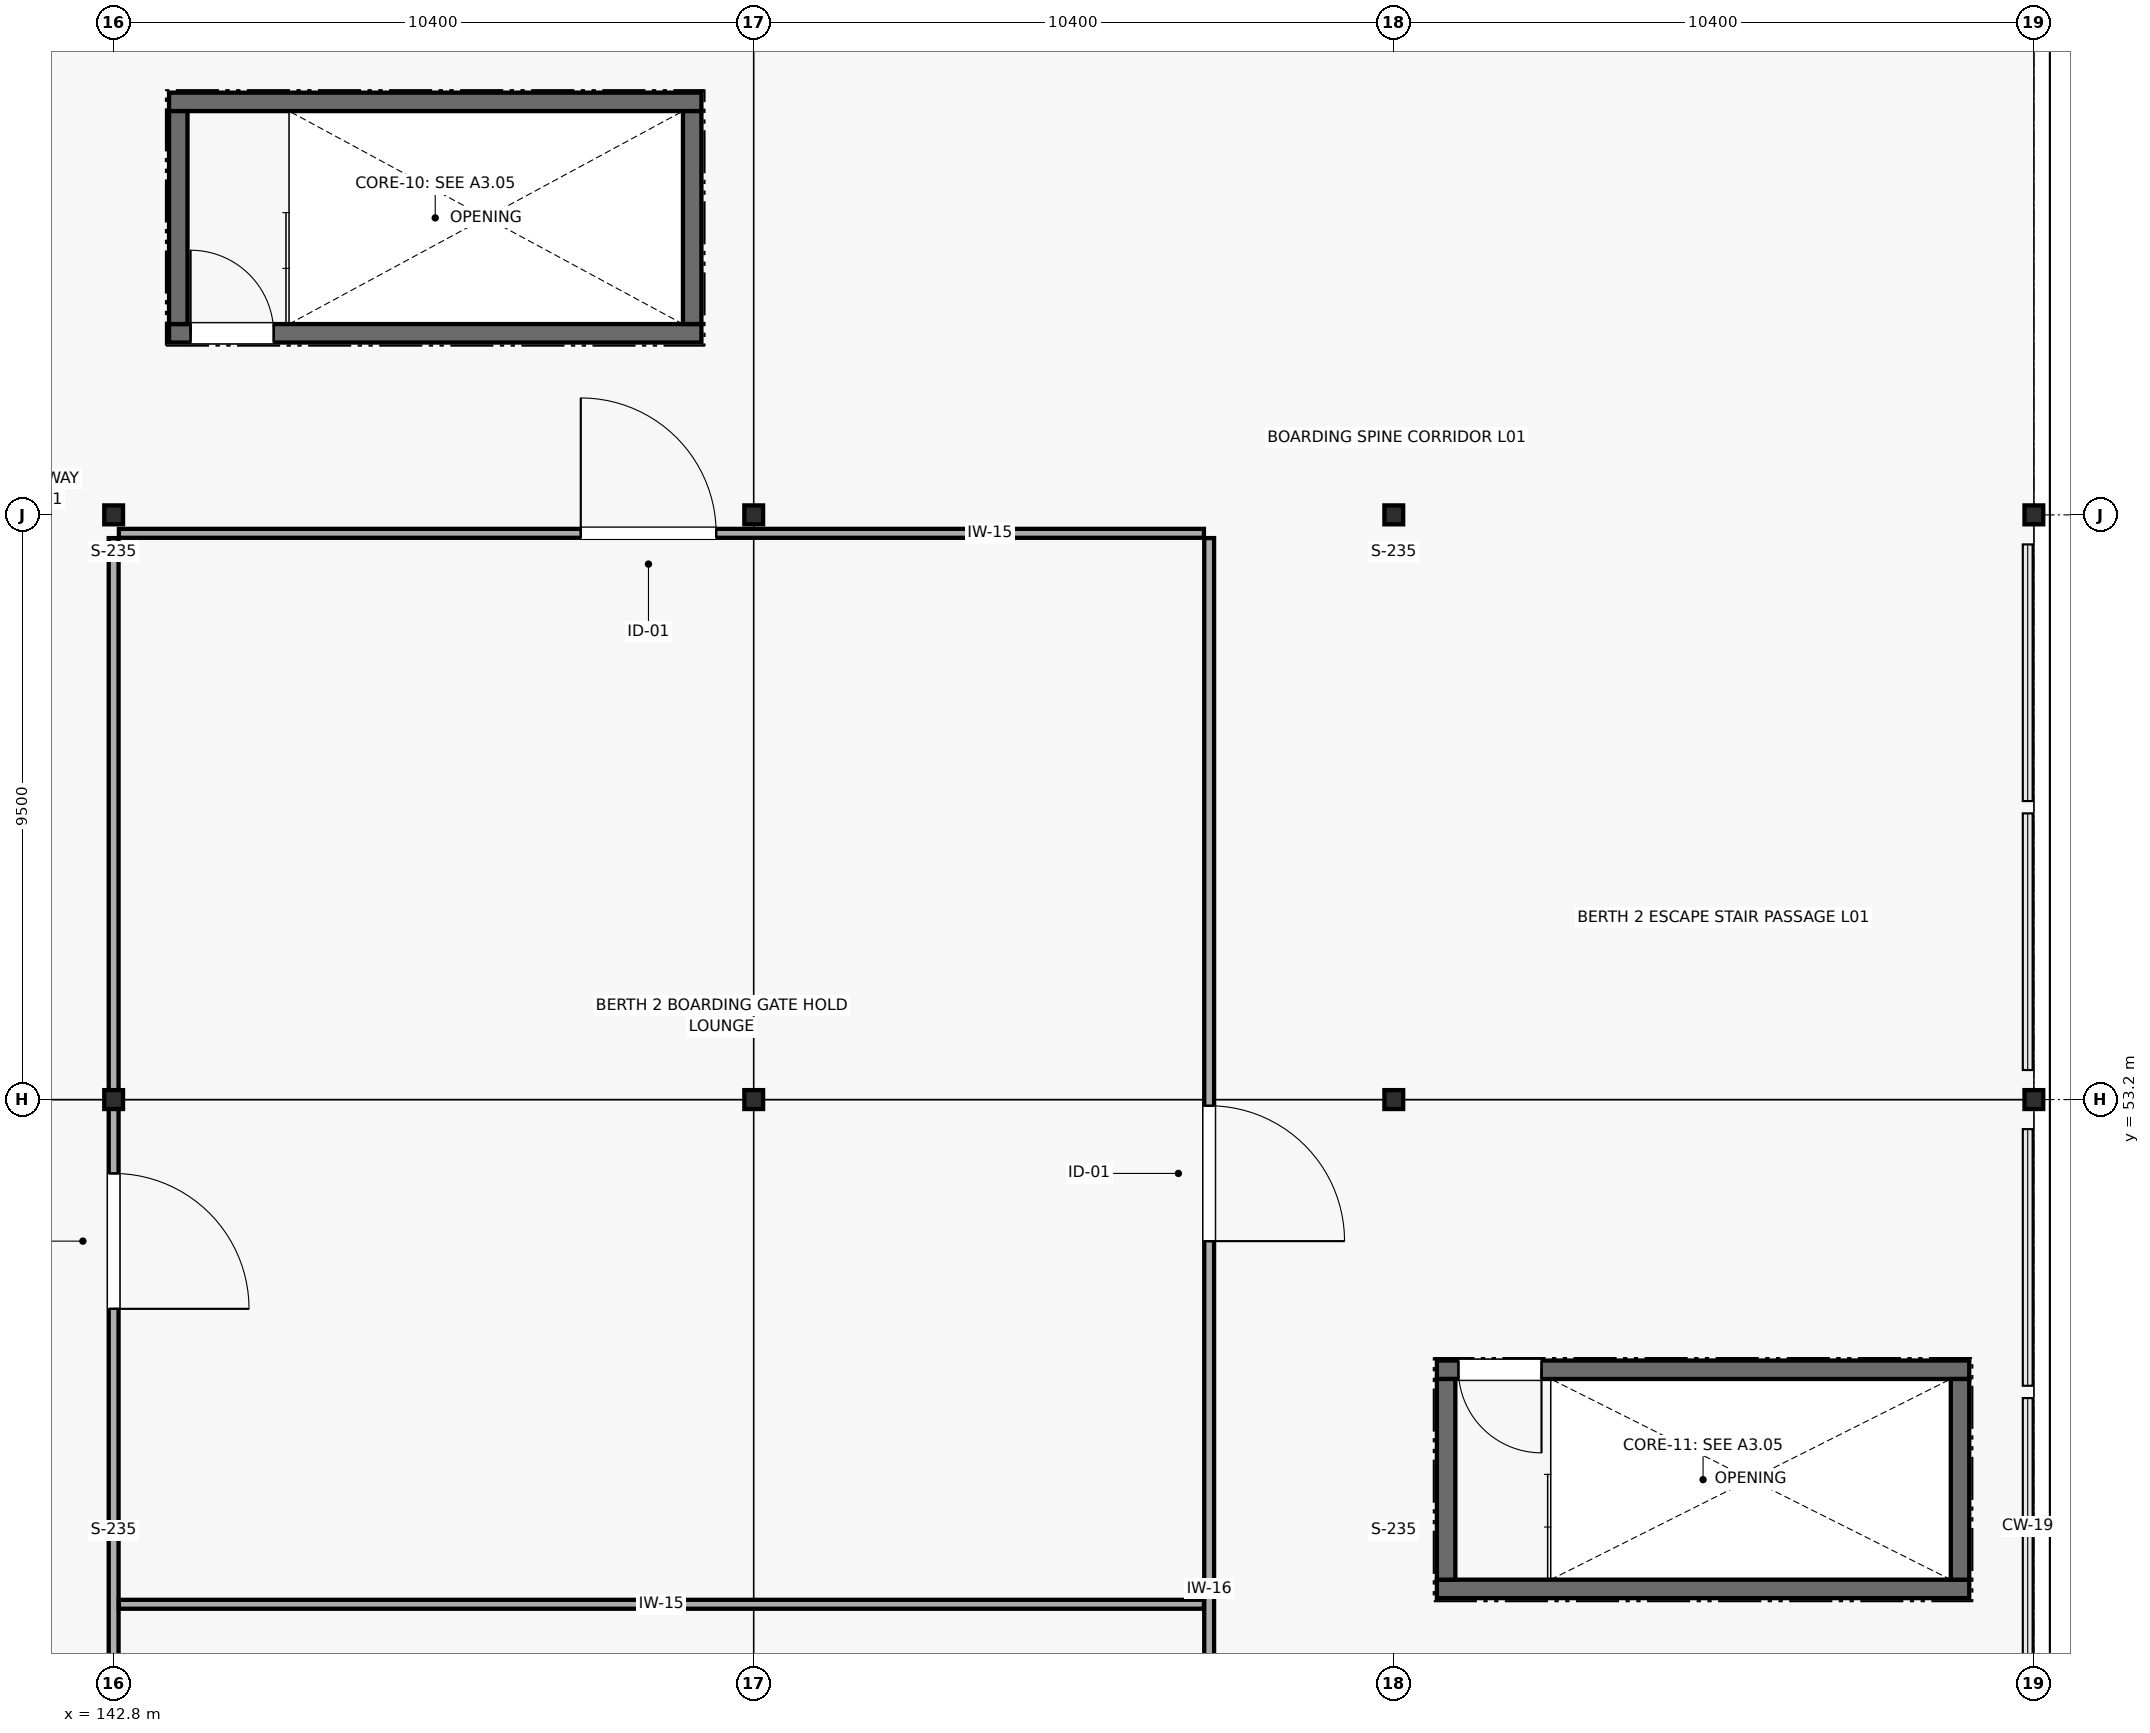
"""IFC4 building model, lengths in metres.
Left out: names, types, materials, properties, quantities, classifications, styles, units other than length and angle.
Written with IfcOpenShell. Run it as: python <this file> out.ifc"""

import sys

from ifc_helpers import new_model, si_unit, direction, frame, frame_2d, origin, origin_2d, place, context, subcontext, project, spatial, rectangle, i_section, extrude, element, fill, save


model = new_model("IFC4")
c1 = context("Model", 3, precision=1e-05, world=origin(), true_north=direction((0.0, 1.0)))
c2 = subcontext(c1, "Body", "Model", "MODEL_VIEW")
j1 = project(units=[si_unit("LENGTHUNIT", "METRE"), si_unit("PLANEANGLEUNIT", "RADIAN")], contexts=[c1])
p1 = place(None, origin())
s1 = spatial("IfcSite", under=j1, at=p1, CompositionType="ELEMENT")
p2 = place(p1, origin())
s2 = spatial("IfcBuilding", under=s1, at=p2, CompositionType="ELEMENT")
p3 = place(p2, frame((0.0, 0.0, 5.4)))
s3 = spatial("IfcBuildingStorey", under=s2, at=p3, CompositionType="ELEMENT", Elevation=5.4)
for number, where, z_axis, x_axis in (
    (1, (142.8, 53.2, 0.0), (0.0, 0.0, 1.0), (1.0, 0.0, 0.0)),
    (2, (142.8, 62.7, 0.0), (0.0, 0.0, 1.0), (1.0, 0.0, 0.0)),
    (3, (153.2, 53.2, 0.0), (0.0, 0.0, 1.0), (1.0, 0.0, 0.0)),
    (4, (153.2, 62.7, 0.0), (0.0, 0.0, 1.0), (1.0, 0.0, 0.0)),
    (5, (163.6, 53.2, 0.0), (0.0, 0.0, 1.0), (1.0, 0.0, 0.0)),
    (6, (163.6, 62.7, 0.0), (0.0, 0.0, 1.0), (1.0, 0.0, 0.0)),
    (7, (174.0, 53.2, 0.0), (0.0, 0.0, 1.0), (1.0, 0.0, 0.0)),
    (8, (174.0, 62.7, 0.0), (0.0, 0.0, 1.0), (1.0, 0.0, 0.0)),
):
    element("IfcColumn", number, at=place(p3, frame(where, z_axis=z_axis, x_axis=x_axis)), inside=s3, PredefinedType="COLUMN", context=c2, shape_type="SweptSolid", body=[
        extrude(i_section(OverallWidth=0.305, OverallDepth=0.307, WebThickness=0.01, FlangeThickness=0.015, FilletRadius=0.015, at=origin_2d()), origin(), (0.0, 0.0, 1.0), 4.5),
    ])
p4 = place(p3, frame((143.7, 65.65, 0.0), z_axis=(0.0, 0.0, 1.0), x_axis=(1.0, 0.0, 0.0)))
e9 = element("IfcWall", 9, at=p4, inside=s3, PredefinedType="SHEAR", context=c2, shape_type="SweptSolid", body=[
    extrude(rectangle(XDim=8.65, YDim=0.3, at=frame_2d((4.325, 0.0))), origin(), (0.0, 0.0, 1.0), 4.29),
])
p5 = place(p4, frame((0.35, 0.0, 0.0)))
e10 = element("IfcOpeningElement", 10, at=p5, cuts=e9, PredefinedType="OPENING", context=c2, shape_type="SweptSolid", body=[
    extrude(rectangle(XDim=1.35, YDim=2.2, at=frame_2d((0.675, 1.1))), frame((0.0, 0.16, 0.0), z_axis=(0.0, -1.0, 0.0), x_axis=(1.0, 0.0, 0.0)), (0.0, 0.0, 1.0), 0.32),
])
p6 = place(p3, frame((152.35, 69.41, 0.0), z_axis=(0.0, 0.0, 1.0), x_axis=(-1.0, 0.0, 0.0)))
e11 = element("IfcWall", 11, at=p6, inside=s3, PredefinedType="SHEAR", context=c2, shape_type="SweptSolid", body=[
    extrude(rectangle(XDim=8.65, YDim=0.3, at=frame_2d((4.325, 0.0))), origin(), (0.0, 0.0, 1.0), 4.29),
])
for number, where, z_axis, x_axis in (
    (12, (143.85, 69.26, 0.0), (0.0, 0.0, 1.0), (0.0, -1.0, 0.0)),
    (13, (152.2, 65.8, 0.0), (0.0, 0.0, 1.0), (0.0, 1.0, 0.0)),
):
    element("IfcWall", number, at=place(p3, frame(where, z_axis=z_axis, x_axis=x_axis)), inside=s3, PredefinedType="SHEAR", context=c2, shape_type="SweptSolid", body=[
        extrude(rectangle(XDim=3.46, YDim=0.3, at=frame_2d((1.73, 0.0))), origin(), (0.0, 0.0, 1.0), 4.29),
    ])
p7 = place(p3, frame((164.3, 45.25, 0.0), z_axis=(0.0, 0.0, 1.0), x_axis=(1.0, 0.0, 0.0)))
e14 = element("IfcWall", 14, at=p7, inside=s3, PredefinedType="SHEAR", context=c2, shape_type="SweptSolid", body=[
    extrude(rectangle(XDim=8.65, YDim=0.3, at=frame_2d((4.325, 0.0))), origin(), (0.0, 0.0, 1.0), 4.29),
])
p8 = place(p3, frame((172.95, 48.81, 0.0), z_axis=(0.0, 0.0, 1.0), x_axis=(-1.0, 0.0, 0.0)))
e15 = element("IfcWall", 15, at=p8, inside=s3, PredefinedType="SHEAR", context=c2, shape_type="SweptSolid", body=[
    extrude(rectangle(XDim=8.65, YDim=0.3, at=frame_2d((4.325, 0.0))), origin(), (0.0, 0.0, 1.0), 4.29),
])
p9 = place(p8, frame((6.95, 0.0, 0.0)))
e16 = element("IfcOpeningElement", 16, at=p9, cuts=e15, PredefinedType="OPENING", context=c2, shape_type="SweptSolid", body=[
    extrude(rectangle(XDim=1.35, YDim=2.2, at=frame_2d((0.675, 1.1))), frame((0.0, 0.16, 0.0), z_axis=(0.0, -1.0, 0.0), x_axis=(1.0, 0.0, 0.0)), (0.0, 0.0, 1.0), 0.32),
])
for number, where, z_axis, x_axis in (
    (17, (164.45, 48.66, 0.0), (0.0, 0.0, 1.0), (0.0, -1.0, 0.0)),
    (18, (172.8, 45.4, 0.0), (0.0, 0.0, 1.0), (0.0, 1.0, 0.0)),
):
    element("IfcWall", number, at=place(p3, frame(where, z_axis=z_axis, x_axis=x_axis)), inside=s3, PredefinedType="SHEAR", context=c2, shape_type="SweptSolid", body=[
        extrude(rectangle(XDim=3.26, YDim=0.3, at=frame_2d((1.63, 0.0))), origin(), (0.0, 0.0, 1.0), 4.29),
    ])
p10 = place(p3, frame((142.8, 33.757, 0.0), z_axis=(0.0, 0.0, 1.0), x_axis=(0.0, 1.0, 0.0)))
e19 = element("IfcWall", 19, at=p10, inside=s3, PredefinedType="PARTITIONING", context=c2, shape_type="SweptSolid", body=[
    extrude(rectangle(XDim=28.565, YDim=0.16, at=frame_2d((14.283, 0.0))), origin(), (0.0, 0.0, 1.0), 3.747),
])
p11 = place(p10, frame((16.042, 0.0, 0.0)))
e20 = element("IfcOpeningElement", 20, at=p11, cuts=e19, PredefinedType="OPENING", context=c2, shape_type="SweptSolid", body=[
    extrude(rectangle(XDim=2.2, YDim=2.5, at=frame_2d((1.1, 1.25))), frame((0.0, 0.09, 0.0), z_axis=(0.0, -1.0, 0.0), x_axis=(1.0, 0.0, 0.0)), (0.0, 0.0, 1.0), 0.18),
])
p12 = place(p3, frame((160.6, 34.4, 0.0), z_axis=(0.0, 0.0, 1.0), x_axis=(0.0, 1.0, 0.0)))
e21 = element("IfcWall", 21, at=p12, inside=s3, PredefinedType="PARTITIONING", context=c2, shape_type="SweptSolid", body=[
    extrude(rectangle(XDim=27.923, YDim=0.16, at=frame_2d((13.961, 0.0))), origin(), (0.0, 0.0, 1.0), 3.683),
])
p13 = place(p12, frame((4.2, 0.0, 0.0)))
e22 = element("IfcOpeningElement", 22, at=p13, cuts=e21, PredefinedType="OPENING", context=c2, shape_type="SweptSolid", body=[
    extrude(rectangle(XDim=1.0, YDim=2.15, at=frame_2d((0.5, 1.075))), frame((0.0, 0.09, 0.0), z_axis=(0.0, -1.0, 0.0), x_axis=(1.0, 0.0, 0.0)), (0.0, 0.0, 1.0), 0.18),
])
p14 = place(p12, frame((16.5, 0.0, 0.0)))
e23 = element("IfcOpeningElement", 23, at=p14, cuts=e21, PredefinedType="OPENING", context=c2, shape_type="SweptSolid", body=[
    extrude(rectangle(XDim=2.2, YDim=2.5, at=frame_2d((1.1, 1.25))), frame((0.0, 0.09, 0.0), z_axis=(0.0, -1.0, 0.0), x_axis=(1.0, 0.0, 0.0)), (0.0, 0.0, 1.0), 0.18),
])
p15 = place(p3, frame((142.885, 45.0, 0.0), z_axis=(0.0, 0.0, 1.0), x_axis=(1.0, 0.0, 0.0)))
e24 = element("IfcWall", 24, at=p15, inside=s3, PredefinedType="PARTITIONING", context=c2, shape_type="SweptSolid", body=[
    extrude(rectangle(XDim=17.63, YDim=0.145, at=frame_2d((8.815, 0.0))), origin(), (0.0, 0.0, 1.0), 3.747),
])
p16 = place(p3, frame((142.885, 62.4, 0.0), z_axis=(0.0, 0.0, 1.0), x_axis=(1.0, 0.0, 0.0)))
e25 = element("IfcWall", 25, at=p16, inside=s3, PredefinedType="PARTITIONING", context=c2, shape_type="SweptSolid", body=[
    extrude(rectangle(XDim=17.63, YDim=0.145, at=frame_2d((8.815, 0.0))), origin(), (0.0, 0.0, 1.0), 3.747),
])
p17 = place(p16, frame((7.505, 0.0, 0.0)))
e26 = element("IfcOpeningElement", 26, at=p17, cuts=e25, PredefinedType="OPENING", context=c2, shape_type="SweptSolid", body=[
    extrude(rectangle(XDim=2.2, YDim=2.5, at=frame_2d((1.1, 1.25))), frame((0.0, 0.083, 0.0), z_axis=(0.0, -1.0, 0.0), x_axis=(1.0, 0.0, 0.0)), (0.0, 0.0, 1.0), 0.165),
])
p18 = place(p5, origin())
e27 = element("IfcDoor", 27, at=p18, inside=s3, OperationType="SINGLE_SWING_LEFT", PredefinedType="DOOR", context=c2, shape_type="SweptSolid", body=[
    extrude(rectangle(XDim=1.35, YDim=2.2, at=frame_2d((0.675, 1.1))), frame((0.0, 0.025, 0.0), z_axis=(0.0, -1.0, 0.0), x_axis=(1.0, 0.0, 0.0)), (0.0, 0.0, 1.0), 0.05),
])
fill(e10, e27)
p19 = place(p9, origin())
e28 = element("IfcDoor", 28, at=p19, inside=s3, OperationType="SINGLE_SWING_LEFT", PredefinedType="DOOR", context=c2, shape_type="SweptSolid", body=[
    extrude(rectangle(XDim=1.35, YDim=2.2, at=frame_2d((0.675, 1.1))), frame((0.0, 0.025, 0.0), z_axis=(0.0, -1.0, 0.0), x_axis=(1.0, 0.0, 0.0)), (0.0, 0.0, 1.0), 0.05),
])
fill(e16, e28)
p20 = place(p11, frame((2.2, 0.0, 0.0), z_axis=(0.0, 0.0, 1.0), x_axis=(-1.0, 0.0, 0.0)))
e29 = element("IfcDoor", 29, at=p20, inside=s3, OperationType="SINGLE_SWING_RIGHT", PredefinedType="DOOR", context=c2, shape_type="SweptSolid", body=[
    extrude(rectangle(XDim=2.2, YDim=2.5, at=frame_2d((1.1, 1.25))), frame((0.0, 0.025, 0.0), z_axis=(0.0, -1.0, 0.0), x_axis=(1.0, 0.0, 0.0)), (0.0, 0.0, 1.0), 0.05),
])
fill(e20, e29)
p21 = place(p14, frame((2.2, 0.0, 0.0), z_axis=(0.0, 0.0, 1.0), x_axis=(-1.0, 0.0, 0.0)))
e30 = element("IfcDoor", 30, at=p21, inside=s3, OperationType="SINGLE_SWING_RIGHT", PredefinedType="DOOR", context=c2, shape_type="SweptSolid", body=[
    extrude(rectangle(XDim=2.2, YDim=2.5, at=frame_2d((1.1, 1.25))), frame((0.0, 0.025, 0.0), z_axis=(0.0, -1.0, 0.0), x_axis=(1.0, 0.0, 0.0)), (0.0, 0.0, 1.0), 0.05),
])
fill(e23, e30)
p22 = place(p17, origin())
e31 = element("IfcDoor", 31, at=p22, inside=s3, OperationType="SINGLE_SWING_LEFT", PredefinedType="DOOR", context=c2, shape_type="SweptSolid", body=[
    extrude(rectangle(XDim=2.2, YDim=2.5, at=frame_2d((1.1, 1.25))), frame((0.0, 0.025, 0.0), z_axis=(0.0, -1.0, 0.0), x_axis=(1.0, 0.0, 0.0)), (0.0, 0.0, 1.0), 0.05),
])
fill(e26, e31)
save(model, sys.argv[1])
